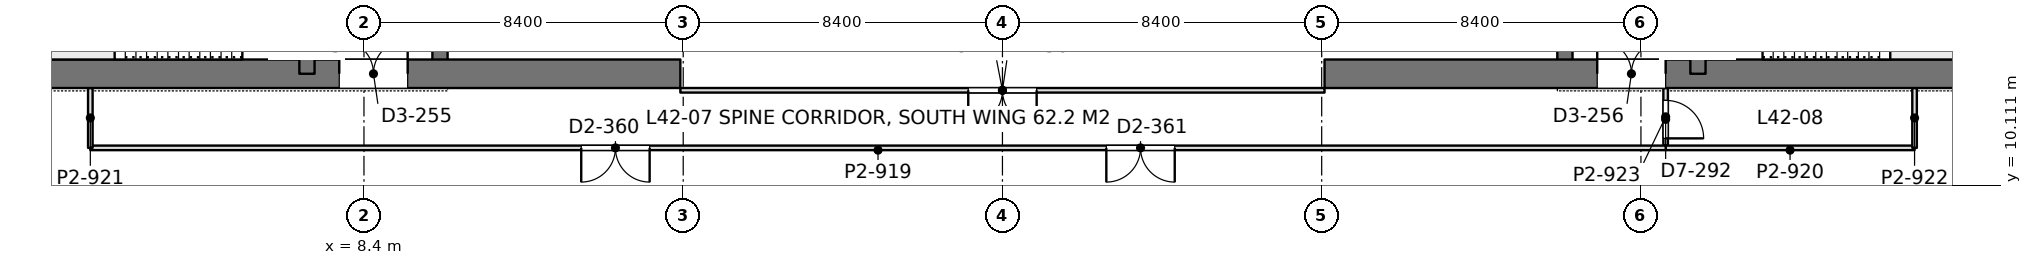
"""IFC4 building model, lengths in metres.
Left out: names, types, materials, properties, quantities, classifications, styles, units other than length and angle.
Written with IfcOpenShell. Run it as: python <this file> out.ifc"""

import sys

from ifc_helpers import new_model, si_unit, direction, frame, frame_2d, origin, place, context, subcontext, project, spatial, rectangle, extrude, element, fill, save


model = new_model("IFC4")
c1 = context("Model", 3, precision=1e-05, world=origin(), true_north=direction((0.0, 1.0)))
c2 = subcontext(c1, "Body", "Model", "MODEL_VIEW")
j1 = project(units=[si_unit("LENGTHUNIT", "METRE"), si_unit("PLANEANGLEUNIT", "RADIAN")], contexts=[c1])
p1 = place(None, origin())
s1 = spatial("IfcSite", under=j1, at=p1, CompositionType="ELEMENT")
p2 = place(p1, origin())
s2 = spatial("IfcBuilding", under=s1, at=p2, CompositionType="ELEMENT")
p3 = place(p2, frame((0.0, 0.0, 186.0)))
s3 = spatial("IfcBuildingStorey", under=s2, at=p3, CompositionType="ELEMENT", Elevation=186.0)
p4 = place(p3, frame((-1.125, 13.05, 0.0), z_axis=(0.0, 0.0, 1.0), x_axis=(1.0, 0.0, 0.0)))
e1 = element("IfcWall", 1, at=p4, inside=s3, PredefinedType="SHEAR", context=c2, shape_type="SweptSolid", body=[
    extrude(rectangle(XDim=17.85, YDim=0.75, at=frame_2d((8.925, 0.0))), origin(), (0.0, 0.0, 1.0), 4.2),
])
p5 = place(p4, frame((8.875, 0.0, 0.0)))
e2 = element("IfcOpeningElement", 2, at=p5, cuts=e1, PredefinedType="OPENING", context=c2, shape_type="SweptSolid", body=[
    extrude(rectangle(XDim=1.8, YDim=2.4, at=frame_2d((0.9, 1.2))), frame((0.0, 0.385, 0.0), z_axis=(0.0, -1.0, 0.0), x_axis=(1.0, 0.0, 0.0)), (0.0, 0.0, 1.0), 0.77),
])
p6 = place(p3, frame((6.9, 13.05, 0.0), z_axis=(0.0, 0.0, 1.0), x_axis=(0.0, 1.0, 0.0)))
e3 = element("IfcWall", 3, at=p6, inside=s3, PredefinedType="SHEAR", context=c2, shape_type="SweptSolid", body=[
    extrude(rectangle(XDim=24.3, YDim=0.4, at=frame_2d((12.15, 0.0))), origin(), (0.0, 0.0, 1.0), 4.2),
])
p7 = place(p6, frame((1.3, 0.0, 0.0)))
e4 = element("IfcOpeningElement", 4, at=p7, cuts=e3, PredefinedType="OPENING", context=c2, shape_type="SweptSolid", body=[
    extrude(rectangle(XDim=1.0, YDim=2.2, at=frame_2d((0.5, 1.1))), frame((0.0, 0.21, 0.0), z_axis=(0.0, -1.0, 0.0), x_axis=(1.0, 0.0, 0.0)), (0.0, 0.0, 1.0), 0.42),
])
p8 = place(p6, frame((22.0, 0.0, 0.0)))
e5 = element("IfcOpeningElement", 5, at=p8, cuts=e3, PredefinedType="OPENING", context=c2, shape_type="SweptSolid", body=[
    extrude(rectangle(XDim=1.0, YDim=2.2, at=frame_2d((0.5, 1.1))), frame((0.0, 0.21, 0.0), z_axis=(0.0, -1.0, 0.0), x_axis=(1.0, 0.0, 0.0)), (0.0, 0.0, 1.0), 0.42),
])
p9 = place(p6, frame((5.55, 0.0, 0.0)))
e6 = element("IfcOpeningElement", 6, at=p9, cuts=e3, PredefinedType="OPENING", context=c2, shape_type="SweptSolid", body=[
    extrude(rectangle(XDim=1.0, YDim=2.2, at=frame_2d((0.5, 1.1))), frame((0.0, 0.21, 0.0), z_axis=(0.0, -1.0, 0.0), x_axis=(1.0, 0.0, 0.0)), (0.0, 0.0, 1.0), 0.42),
])
p10 = place(p6, frame((9.55, 0.0, 0.0)))
e7 = element("IfcOpeningElement", 7, at=p10, cuts=e3, PredefinedType="OPENING", context=c2, shape_type="SweptSolid", body=[
    extrude(rectangle(XDim=1.0, YDim=2.2, at=frame_2d((0.5, 1.1))), frame((0.0, 0.21, 0.0), z_axis=(0.0, -1.0, 0.0), x_axis=(1.0, 0.0, 0.0)), (0.0, 0.0, 1.0), 0.42),
])
p11 = place(p6, frame((12.8, 0.0, 0.0)))
e8 = element("IfcOpeningElement", 8, at=p11, cuts=e3, PredefinedType="OPENING", context=c2, shape_type="SweptSolid", body=[
    extrude(rectangle(XDim=1.1, YDim=2.2, at=frame_2d((0.55, 1.1))), frame((0.0, 0.21, 0.0), z_axis=(0.0, -1.0, 0.0), x_axis=(1.0, 0.0, 0.0)), (0.0, 0.0, 1.0), 0.42),
])
p12 = place(p6, frame((15.538, 0.0, 0.0)))
e9 = element("IfcOpeningElement", 9, at=p12, cuts=e3, PredefinedType="OPENING", context=c2, shape_type="SweptSolid", body=[
    extrude(rectangle(XDim=1.1, YDim=2.2, at=frame_2d((0.55, 1.1))), frame((0.0, 0.21, 0.0), z_axis=(0.0, -1.0, 0.0), x_axis=(1.0, 0.0, 0.0)), (0.0, 0.0, 1.0), 0.42),
])
p13 = place(p6, frame((18.262, 0.0, 0.0)))
e10 = element("IfcOpeningElement", 10, at=p13, cuts=e3, PredefinedType="OPENING", context=c2, shape_type="SweptSolid", body=[
    extrude(rectangle(XDim=1.1, YDim=2.2, at=frame_2d((0.55, 1.1))), frame((0.0, 0.21, 0.0), z_axis=(0.0, -1.0, 0.0), x_axis=(1.0, 0.0, 0.0)), (0.0, 0.0, 1.0), 0.42),
])
p14 = place(p3, frame((10.4, 13.05, 0.0), z_axis=(0.0, 0.0, 1.0), x_axis=(0.0, 1.0, 0.0)))
e11 = element("IfcWall", 11, at=p14, inside=s3, PredefinedType="SHEAR", context=c2, shape_type="SweptSolid", body=[
    extrude(rectangle(XDim=24.3, YDim=0.4, at=frame_2d((12.15, 0.0))), origin(), (0.0, 0.0, 1.0), 4.2),
])
p15 = place(p14, frame((15.75, 0.0, 0.0)))
e12 = element("IfcOpeningElement", 12, at=p15, cuts=e11, PredefinedType="OPENING", context=c2, shape_type="SweptSolid", body=[
    extrude(rectangle(XDim=1.1, YDim=2.2, at=frame_2d((0.55, 1.1))), frame((0.0, 0.21, 0.0), z_axis=(0.0, -1.0, 0.0), x_axis=(1.0, 0.0, 0.0)), (0.0, 0.0, 1.0), 0.42),
])
p16 = place(p14, frame((18.6, 0.0, 0.0)))
e13 = element("IfcOpeningElement", 13, at=p16, cuts=e11, PredefinedType="OPENING", context=c2, shape_type="SweptSolid", body=[
    extrude(rectangle(XDim=1.1, YDim=2.2, at=frame_2d((0.55, 1.1))), frame((0.0, 0.21, 0.0), z_axis=(0.0, -1.0, 0.0), x_axis=(1.0, 0.0, 0.0)), (0.0, 0.0, 1.0), 0.42),
])
p17 = place(p14, frame((21.45, 0.0, 0.0)))
e14 = element("IfcOpeningElement", 14, at=p17, cuts=e11, PredefinedType="OPENING", context=c2, shape_type="SweptSolid", body=[
    extrude(rectangle(XDim=1.1, YDim=2.2, at=frame_2d((0.55, 1.1))), frame((0.0, 0.21, 0.0), z_axis=(0.0, -1.0, 0.0), x_axis=(1.0, 0.0, 0.0)), (0.0, 0.0, 1.0), 0.42),
])
p18 = place(p14, frame((6.05, 0.0, 0.0)))
e15 = element("IfcOpeningElement", 15, at=p18, cuts=e11, PredefinedType="OPENING", context=c2, shape_type="SweptSolid", body=[
    extrude(rectangle(XDim=1.8, YDim=2.4, at=frame_2d((0.9, 1.2))), frame((0.0, 0.21, 0.0), z_axis=(0.0, -1.0, 0.0), x_axis=(1.0, 0.0, 0.0)), (0.0, 0.0, 1.0), 0.42),
])
p19 = place(p14, frame((11.25, 0.0, 0.0)))
e16 = element("IfcOpeningElement", 16, at=p19, cuts=e11, PredefinedType="OPENING", context=c2, shape_type="SweptSolid", body=[
    extrude(rectangle(XDim=1.8, YDim=2.4, at=frame_2d((0.9, 1.2))), frame((0.0, 0.21, 0.0), z_axis=(0.0, -1.0, 0.0), x_axis=(1.0, 0.0, 0.0)), (0.0, 0.0, 1.0), 0.42),
])
p20 = place(p3, frame((33.675, 13.05, 0.0), z_axis=(0.0, 0.0, 1.0), x_axis=(1.0, 0.0, 0.0)))
e17 = element("IfcWall", 17, at=p20, inside=s3, PredefinedType="SHEAR", context=c2, shape_type="SweptSolid", body=[
    extrude(rectangle(XDim=17.85, YDim=0.75, at=frame_2d((8.925, 0.0))), origin(), (0.0, 0.0, 1.0), 4.2),
])
p21 = place(p20, frame((7.175, 0.0, 0.0)))
e18 = element("IfcOpeningElement", 18, at=p21, cuts=e17, PredefinedType="OPENING", context=c2, shape_type="SweptSolid", body=[
    extrude(rectangle(XDim=1.8, YDim=2.4, at=frame_2d((0.9, 1.2))), frame((0.0, 0.385, 0.0), z_axis=(0.0, -1.0, 0.0), x_axis=(1.0, 0.0, 0.0)), (0.0, 0.0, 1.0), 0.77),
])
p22 = place(p3, frame((43.5, 13.05, 0.0), z_axis=(0.0, 0.0, 1.0), x_axis=(0.0, 1.0, 0.0)))
e19 = element("IfcWall", 19, at=p22, inside=s3, PredefinedType="SHEAR", context=c2, shape_type="SweptSolid", body=[
    extrude(rectangle(XDim=24.3, YDim=0.4, at=frame_2d((12.15, 0.0))), origin(), (0.0, 0.0, 1.0), 4.2),
])
p23 = place(p22, frame((1.3, 0.0, 0.0)))
e20 = element("IfcOpeningElement", 20, at=p23, cuts=e19, PredefinedType="OPENING", context=c2, shape_type="SweptSolid", body=[
    extrude(rectangle(XDim=1.0, YDim=2.2, at=frame_2d((0.5, 1.1))), frame((0.0, 0.21, 0.0), z_axis=(0.0, -1.0, 0.0), x_axis=(1.0, 0.0, 0.0)), (0.0, 0.0, 1.0), 0.42),
])
p24 = place(p22, frame((22.0, 0.0, 0.0)))
e21 = element("IfcOpeningElement", 21, at=p24, cuts=e19, PredefinedType="OPENING", context=c2, shape_type="SweptSolid", body=[
    extrude(rectangle(XDim=1.0, YDim=2.2, at=frame_2d((0.5, 1.1))), frame((0.0, 0.21, 0.0), z_axis=(0.0, -1.0, 0.0), x_axis=(1.0, 0.0, 0.0)), (0.0, 0.0, 1.0), 0.42),
])
p25 = place(p22, frame((5.55, 0.0, 0.0)))
e22 = element("IfcOpeningElement", 22, at=p25, cuts=e19, PredefinedType="OPENING", context=c2, shape_type="SweptSolid", body=[
    extrude(rectangle(XDim=1.0, YDim=2.2, at=frame_2d((0.5, 1.1))), frame((0.0, 0.21, 0.0), z_axis=(0.0, -1.0, 0.0), x_axis=(1.0, 0.0, 0.0)), (0.0, 0.0, 1.0), 0.42),
])
p26 = place(p22, frame((9.55, 0.0, 0.0)))
e23 = element("IfcOpeningElement", 23, at=p26, cuts=e19, PredefinedType="OPENING", context=c2, shape_type="SweptSolid", body=[
    extrude(rectangle(XDim=1.0, YDim=2.2, at=frame_2d((0.5, 1.1))), frame((0.0, 0.21, 0.0), z_axis=(0.0, -1.0, 0.0), x_axis=(1.0, 0.0, 0.0)), (0.0, 0.0, 1.0), 0.42),
])
p27 = place(p22, frame((12.8, 0.0, 0.0)))
e24 = element("IfcOpeningElement", 24, at=p27, cuts=e19, PredefinedType="OPENING", context=c2, shape_type="SweptSolid", body=[
    extrude(rectangle(XDim=1.1, YDim=2.2, at=frame_2d((0.55, 1.1))), frame((0.0, 0.21, 0.0), z_axis=(0.0, -1.0, 0.0), x_axis=(1.0, 0.0, 0.0)), (0.0, 0.0, 1.0), 0.42),
])
p28 = place(p22, frame((15.538, 0.0, 0.0)))
e25 = element("IfcOpeningElement", 25, at=p28, cuts=e19, PredefinedType="OPENING", context=c2, shape_type="SweptSolid", body=[
    extrude(rectangle(XDim=1.1, YDim=2.2, at=frame_2d((0.55, 1.1))), frame((0.0, 0.21, 0.0), z_axis=(0.0, -1.0, 0.0), x_axis=(1.0, 0.0, 0.0)), (0.0, 0.0, 1.0), 0.42),
])
p29 = place(p22, frame((18.262, 0.0, 0.0)))
e26 = element("IfcOpeningElement", 26, at=p29, cuts=e19, PredefinedType="OPENING", context=c2, shape_type="SweptSolid", body=[
    extrude(rectangle(XDim=1.1, YDim=2.2, at=frame_2d((0.55, 1.1))), frame((0.0, 0.21, 0.0), z_axis=(0.0, -1.0, 0.0), x_axis=(1.0, 0.0, 0.0)), (0.0, 0.0, 1.0), 0.42),
])
p30 = place(p3, frame((40.0, 13.05, 0.0), z_axis=(0.0, 0.0, 1.0), x_axis=(0.0, 1.0, 0.0)))
e27 = element("IfcWall", 27, at=p30, inside=s3, PredefinedType="SHEAR", context=c2, shape_type="SweptSolid", body=[
    extrude(rectangle(XDim=24.3, YDim=0.4, at=frame_2d((12.15, 0.0))), origin(), (0.0, 0.0, 1.0), 4.2),
])
p31 = place(p30, frame((15.75, 0.0, 0.0)))
e28 = element("IfcOpeningElement", 28, at=p31, cuts=e27, PredefinedType="OPENING", context=c2, shape_type="SweptSolid", body=[
    extrude(rectangle(XDim=1.1, YDim=2.2, at=frame_2d((0.55, 1.1))), frame((0.0, 0.21, 0.0), z_axis=(0.0, -1.0, 0.0), x_axis=(1.0, 0.0, 0.0)), (0.0, 0.0, 1.0), 0.42),
])
p32 = place(p30, frame((18.6, 0.0, 0.0)))
e29 = element("IfcOpeningElement", 29, at=p32, cuts=e27, PredefinedType="OPENING", context=c2, shape_type="SweptSolid", body=[
    extrude(rectangle(XDim=1.1, YDim=2.2, at=frame_2d((0.55, 1.1))), frame((0.0, 0.21, 0.0), z_axis=(0.0, -1.0, 0.0), x_axis=(1.0, 0.0, 0.0)), (0.0, 0.0, 1.0), 0.42),
])
p33 = place(p30, frame((21.45, 0.0, 0.0)))
e30 = element("IfcOpeningElement", 30, at=p33, cuts=e27, PredefinedType="OPENING", context=c2, shape_type="SweptSolid", body=[
    extrude(rectangle(XDim=1.1, YDim=2.2, at=frame_2d((0.55, 1.1))), frame((0.0, 0.21, 0.0), z_axis=(0.0, -1.0, 0.0), x_axis=(1.0, 0.0, 0.0)), (0.0, 0.0, 1.0), 0.42),
])
p34 = place(p30, frame((6.05, 0.0, 0.0)))
e31 = element("IfcOpeningElement", 31, at=p34, cuts=e27, PredefinedType="OPENING", context=c2, shape_type="SweptSolid", body=[
    extrude(rectangle(XDim=1.8, YDim=2.4, at=frame_2d((0.9, 1.2))), frame((0.0, 0.21, 0.0), z_axis=(0.0, -1.0, 0.0), x_axis=(1.0, 0.0, 0.0)), (0.0, 0.0, 1.0), 0.42),
])
p35 = place(p30, frame((11.25, 0.0, 0.0)))
e32 = element("IfcOpeningElement", 32, at=p35, cuts=e27, PredefinedType="OPENING", context=c2, shape_type="SweptSolid", body=[
    extrude(rectangle(XDim=1.8, YDim=2.4, at=frame_2d((0.9, 1.2))), frame((0.0, 0.21, 0.0), z_axis=(0.0, -1.0, 0.0), x_axis=(1.0, 0.0, 0.0)), (0.0, 0.0, 1.0), 0.42),
])
p36 = place(p3, frame((1.2, 11.1, 0.0), z_axis=(0.0, 0.0, 1.0), x_axis=(1.0, 0.0, 0.0)))
e33 = element("IfcWall", 33, at=p36, inside=s3, PredefinedType="PARTITIONING", context=c2, shape_type="SweptSolid", body=[
    extrude(rectangle(XDim=41.452, YDim=0.12, at=frame_2d((20.726, 0.0))), origin(), (0.0, 0.0, 1.0), 3.55),
])
p37 = place(p36, frame((12.917, 0.0, 0.0)))
e34 = element("IfcOpeningElement", 34, at=p37, cuts=e33, PredefinedType="OPENING", context=c2, shape_type="SweptSolid", body=[
    extrude(rectangle(XDim=1.8, YDim=2.2, at=frame_2d((0.9, 1.1))), frame((0.0, 0.07, 0.0), z_axis=(0.0, -1.0, 0.0), x_axis=(1.0, 0.0, 0.0)), (0.0, 0.0, 1.0), 0.14),
])
p38 = place(p36, frame((26.733, 0.0, 0.0)))
e35 = element("IfcOpeningElement", 35, at=p38, cuts=e33, PredefinedType="OPENING", context=c2, shape_type="SweptSolid", body=[
    extrude(rectangle(XDim=1.8, YDim=2.2, at=frame_2d((0.9, 1.1))), frame((0.0, 0.07, 0.0), z_axis=(0.0, -1.0, 0.0), x_axis=(1.0, 0.0, 0.0)), (0.0, 0.0, 1.0), 0.14),
])
p39 = place(p3, frame((1.2, 11.1, 0.0), z_axis=(0.0, 0.0, 1.0), x_axis=(0.0, 1.0, 0.0)))
e36 = element("IfcWall", 36, at=p39, inside=s3, PredefinedType="PARTITIONING", context=c2, shape_type="SweptSolid", body=[
    extrude(rectangle(XDim=1.576, YDim=0.12, at=frame_2d((0.788, 0.0))), origin(), (0.0, 0.0, 1.0), 4.05),
])
p40 = place(p3, frame((42.65, 11.158, 0.0), z_axis=(0.0, 0.0, 1.0), x_axis=(0.0, 1.0, 0.0)))
e37 = element("IfcWall", 37, at=p40, inside=s3, PredefinedType="PARTITIONING", context=c2, shape_type="SweptSolid", body=[
    extrude(rectangle(XDim=1.518, YDim=0.12, at=frame_2d((0.759, 0.0))), origin(), (0.0, 0.0, 1.0), 4.05),
])
p41 = place(p40, frame((0.192, 0.0, 0.0)))
e38 = element("IfcOpeningElement", 38, at=p41, cuts=e37, PredefinedType="OPENING", context=c2, shape_type="SweptSolid", body=[
    extrude(rectangle(XDim=1.0, YDim=2.4, at=frame_2d((0.5, 1.2))), frame((0.0, 0.07, 0.0), z_axis=(0.0, -1.0, 0.0), x_axis=(1.0, 0.0, 0.0)), (0.0, 0.0, 1.0), 0.14),
])
p42 = place(p3, frame((42.648, 11.1, 0.0), z_axis=(0.0, 0.0, 1.0), x_axis=(1.0, 0.0, 0.0)))
e39 = element("IfcWall", 39, at=p42, inside=s3, PredefinedType="PARTITIONING", context=c2, shape_type="SweptSolid", body=[
    extrude(rectangle(XDim=6.552, YDim=0.12, at=frame_2d((3.276, 0.0))), origin(), (0.0, 0.0, 1.0), 4.05),
])
p43 = place(p3, frame((49.2, 11.1, 0.0), z_axis=(0.0, 0.0, 1.0), x_axis=(0.0, 1.0, 0.0)))
e40 = element("IfcWall", 40, at=p43, inside=s3, PredefinedType="PARTITIONING", context=c2, shape_type="SweptSolid", body=[
    extrude(rectangle(XDim=1.576, YDim=0.12, at=frame_2d((0.788, 0.0))), origin(), (0.0, 0.0, 1.0), 4.05),
])
p44 = place(p3, frame((16.725, 12.615, 0.0), z_axis=(0.0, 0.0, 1.0), x_axis=(1.0, 0.0, 0.0)))
e41 = element("IfcWall", 41, at=p44, inside=s3, PredefinedType="PARTITIONING", context=c2, shape_type="SweptSolid", body=[
    extrude(rectangle(XDim=16.95, YDim=0.12, at=frame_2d((8.475, 0.0))), origin(), (0.0, 0.0, 1.0), 3.55),
])
p45 = place(p44, frame((7.575, 0.0, 0.0)))
e42 = element("IfcOpeningElement", 42, at=p45, cuts=e41, PredefinedType="OPENING", context=c2, shape_type="SweptSolid", body=[
    extrude(rectangle(XDim=1.8, YDim=2.2, at=frame_2d((0.9, 1.1))), frame((0.0, 0.07, 0.0), z_axis=(0.0, -1.0, 0.0), x_axis=(1.0, 0.0, 0.0)), (0.0, 0.0, 1.0), 0.14),
])
p46 = place(p5, origin())
e43 = element("IfcDoor", 43, at=p46, inside=s3, OperationType="DOUBLE_DOOR_SINGLE_SWING", PredefinedType="DOOR", context=c2, shape_type="SweptSolid", body=[
    extrude(rectangle(XDim=1.8, YDim=2.4, at=frame_2d((0.9, 1.2))), frame((0.0, 0.025, 0.0), z_axis=(0.0, -1.0, 0.0), x_axis=(1.0, 0.0, 0.0)), (0.0, 0.0, 1.0), 0.05),
])
fill(e2, e43)
p47 = place(p21, origin())
e44 = element("IfcDoor", 44, at=p47, inside=s3, OperationType="DOUBLE_DOOR_SINGLE_SWING", PredefinedType="DOOR", context=c2, shape_type="SweptSolid", body=[
    extrude(rectangle(XDim=1.8, YDim=2.4, at=frame_2d((0.9, 1.2))), frame((0.0, 0.025, 0.0), z_axis=(0.0, -1.0, 0.0), x_axis=(1.0, 0.0, 0.0)), (0.0, 0.0, 1.0), 0.05),
])
fill(e18, e44)
p48 = place(p37, frame((1.8, 0.0, 0.0), z_axis=(0.0, 0.0, 1.0), x_axis=(-1.0, 0.0, 0.0)))
e45 = element("IfcDoor", 45, at=p48, inside=s3, OperationType="DOUBLE_DOOR_SINGLE_SWING", PredefinedType="DOOR", context=c2, shape_type="SweptSolid", body=[
    extrude(rectangle(XDim=1.8, YDim=2.2, at=frame_2d((0.9, 1.1))), frame((0.0, 0.025, 0.0), z_axis=(0.0, -1.0, 0.0), x_axis=(1.0, 0.0, 0.0)), (0.0, 0.0, 1.0), 0.05),
])
fill(e34, e45)
p49 = place(p38, frame((1.8, 0.0, 0.0), z_axis=(0.0, 0.0, 1.0), x_axis=(-1.0, 0.0, 0.0)))
e46 = element("IfcDoor", 46, at=p49, inside=s3, OperationType="DOUBLE_DOOR_SINGLE_SWING", PredefinedType="DOOR", context=c2, shape_type="SweptSolid", body=[
    extrude(rectangle(XDim=1.8, YDim=2.2, at=frame_2d((0.9, 1.1))), frame((0.0, 0.025, 0.0), z_axis=(0.0, -1.0, 0.0), x_axis=(1.0, 0.0, 0.0)), (0.0, 0.0, 1.0), 0.05),
])
fill(e35, e46)
p50 = place(p41, frame((1.0, 0.0, 0.0), z_axis=(0.0, 0.0, 1.0), x_axis=(-1.0, 0.0, 0.0)))
e47 = element("IfcDoor", 47, at=p50, inside=s3, OperationType="SINGLE_SWING_RIGHT", PredefinedType="DOOR", context=c2, shape_type="SweptSolid", body=[
    extrude(rectangle(XDim=1.0, YDim=2.4, at=frame_2d((0.5, 1.2))), frame((0.0, 0.025, 0.0), z_axis=(0.0, -1.0, 0.0), x_axis=(1.0, 0.0, 0.0)), (0.0, 0.0, 1.0), 0.05),
])
fill(e38, e47)
p51 = place(p45, frame((1.8, 0.0, 0.0), z_axis=(0.0, 0.0, 1.0), x_axis=(-1.0, 0.0, 0.0)))
e48 = element("IfcDoor", 48, at=p51, inside=s3, OperationType="DOUBLE_DOOR_SINGLE_SWING", PredefinedType="DOOR", context=c2, shape_type="SweptSolid", body=[
    extrude(rectangle(XDim=1.8, YDim=2.2, at=frame_2d((0.9, 1.1))), frame((0.0, 0.025, 0.0), z_axis=(0.0, -1.0, 0.0), x_axis=(1.0, 0.0, 0.0)), (0.0, 0.0, 1.0), 0.05),
])
fill(e42, e48)
save(model, sys.argv[1])
